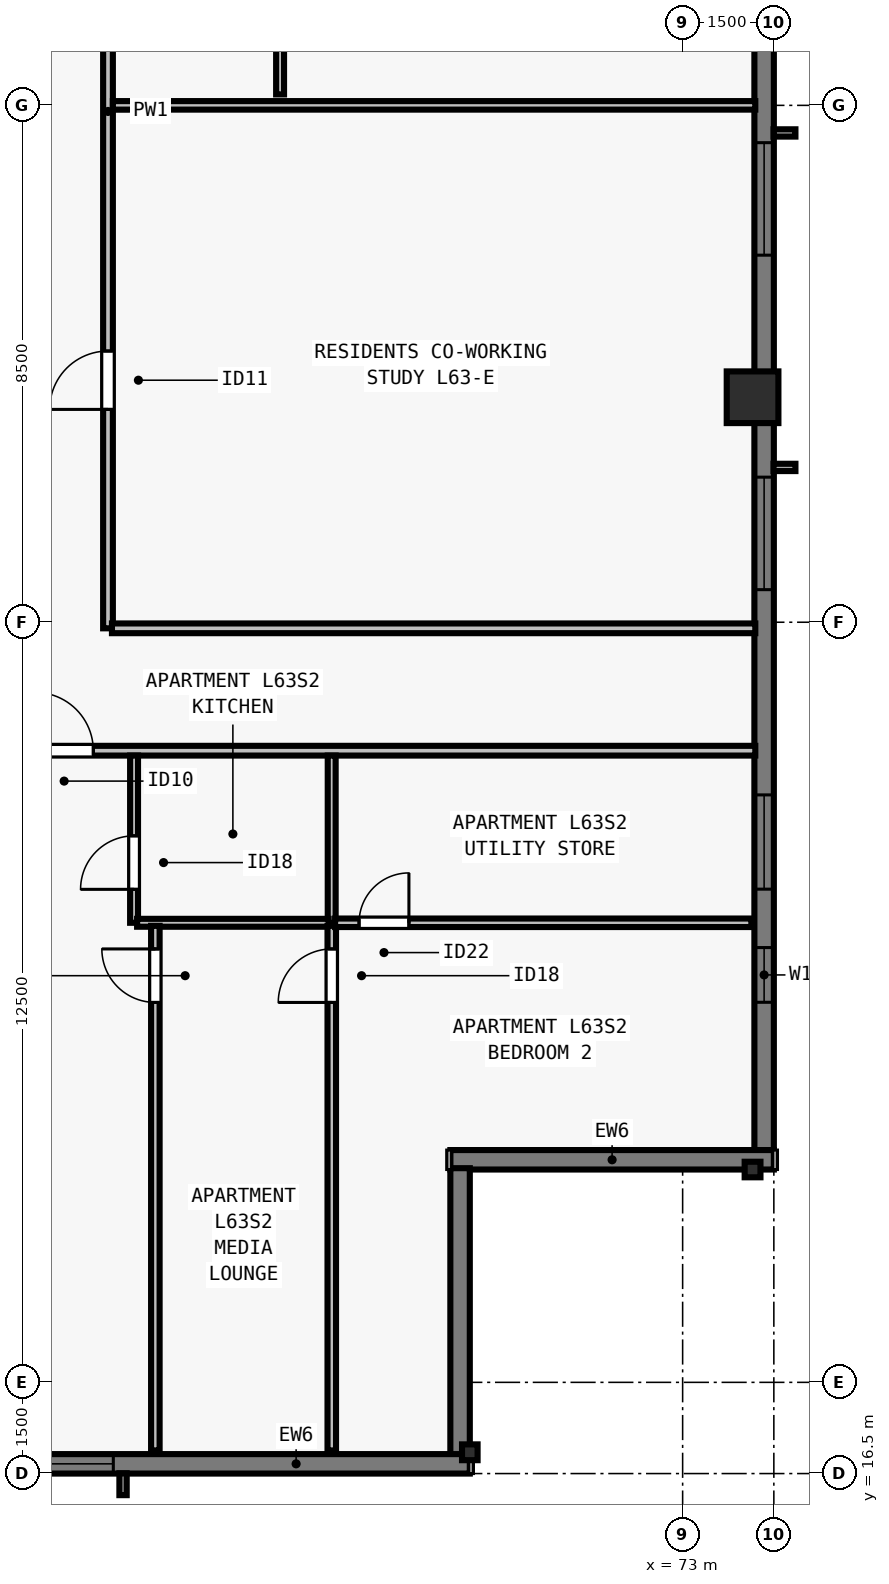
"""IFC4 building model, lengths in metres.
Left out: names, types, materials, properties, quantities, classifications, styles, units other than length and angle.
Written with IfcOpenShell. Run it as: python <this file> out.ifc"""

import sys

from ifc_helpers import new_model, si_unit, direction, frame, frame_2d, origin, origin_2d, place, context, subcontext, project, spatial, rectangle, i_section, extrude, element, fill, save


model = new_model("IFC4")
c1 = context("Model", 3, precision=1e-05, world=origin(), true_north=direction((0.0, 1.0)))
c2 = subcontext(c1, "Body", "Model", "MODEL_VIEW")
j1 = project(units=[si_unit("LENGTHUNIT", "METRE"), si_unit("PLANEANGLEUNIT", "RADIAN")], contexts=[c1])
p1 = place(None, origin())
s1 = spatial("IfcSite", under=j1, at=p1, CompositionType="ELEMENT")
p2 = place(p1, origin())
s2 = spatial("IfcBuilding", under=s1, at=p2, CompositionType="ELEMENT")
p3 = place(p2, frame((0.0, 0.0, 230.5)))
s3 = spatial("IfcBuildingStorey", under=s2, at=p3, CompositionType="ELEMENT", Elevation=230.5)
for number, where, z_axis, x_axis in (
    (1, (69.5, 16.85, 0.0), (0.0, 0.0, 1.0), (1.0, 0.0, 0.0)),
    (2, (74.15, 21.5, 0.0), (0.0, 0.0, 1.0), (0.0, 1.0, 0.0)),
):
    element("IfcColumn", number, at=place(p3, frame(where, z_axis=z_axis, x_axis=x_axis)), inside=s3, PredefinedType="COLUMN", context=c2, shape_type="SweptSolid", body=[
        extrude(i_section(OverallWidth=0.256, OverallDepth=0.26, WebThickness=0.01, FlangeThickness=0.017, FilletRadius=0.013, at=origin_2d()), origin(), (0.0, 0.0, 1.0), 3.5),
    ])
p4 = place(p3, frame((74.15, 34.2, 0.0), z_axis=(0.0, 0.0, 1.0), x_axis=(0.0, 1.0, 0.0)))
e3 = element("IfcColumn", 3, at=p4, inside=s3, PredefinedType="COLUMN", context=c2, shape_type="SweptSolid", body=[
    extrude(rectangle(XDim=0.85, YDim=0.85, at=origin_2d()), origin(), (0.0, 0.0, 1.0), 3.5),
])
p5 = place(p3, frame((74.34, 56.5, 0.0), z_axis=(0.0, 0.0, 1.0), x_axis=(0.0, -1.0, 0.0)))
e4 = element("IfcWall", 4, at=p5, inside=s3, PredefinedType="SOLIDWALL", context=c2, shape_type="SweptSolid", body=[
    extrude(rectangle(XDim=34.702, YDim=0.32, at=frame_2d((17.351, 0.0))), origin(), (0.0, 0.0, 1.0), 3.29),
])
p6 = place(p5, frame((4.613, 0.0, 0.8)))
e5 = element("IfcOpeningElement", 5, at=p6, cuts=e4, PredefinedType="OPENING", context=c2, shape_type="SweptSolid", body=[
    extrude(rectangle(XDim=1.85, YDim=1.678, at=frame_2d((0.925, 0.839))), frame((0.0, 0.17, 0.0), z_axis=(0.0, -1.0, 0.0), x_axis=(1.0, 0.0, 0.0)), (0.0, 0.0, 1.0), 0.34),
])
p7 = place(p5, frame((9.388, 0.0, 0.8)))
e6 = element("IfcOpeningElement", 6, at=p7, cuts=e4, PredefinedType="OPENING", context=c2, shape_type="SweptSolid", body=[
    extrude(rectangle(XDim=1.55, YDim=1.678, at=frame_2d((0.775, 0.839))), frame((0.0, 0.17, 0.0), z_axis=(0.0, -1.0, 0.0), x_axis=(1.0, 0.0, 0.0)), (0.0, 0.0, 1.0), 0.34),
])
p8 = place(p5, frame((14.888, 0.0, 0.8)))
e7 = element("IfcOpeningElement", 7, at=p8, cuts=e4, PredefinedType="OPENING", context=c2, shape_type="SweptSolid", body=[
    extrude(rectangle(XDim=1.55, YDim=1.678, at=frame_2d((0.775, 0.839))), frame((0.0, 0.17, 0.0), z_axis=(0.0, -1.0, 0.0), x_axis=(1.0, 0.0, 0.0)), (0.0, 0.0, 1.0), 0.34),
])
p9 = place(p5, frame((18.114, 0.0, 0.8)))
e8 = element("IfcOpeningElement", 8, at=p9, cuts=e4, PredefinedType="OPENING", context=c2, shape_type="SweptSolid", body=[
    extrude(rectangle(XDim=1.85, YDim=1.678, at=frame_2d((0.925, 0.839))), frame((0.0, 0.17, 0.0), z_axis=(0.0, -1.0, 0.0), x_axis=(1.0, 0.0, 0.0)), (0.0, 0.0, 1.0), 0.34),
])
p10 = place(p5, frame((23.614, 0.0, 0.8)))
e9 = element("IfcOpeningElement", 9, at=p10, cuts=e4, PredefinedType="OPENING", context=c2, shape_type="SweptSolid", body=[
    extrude(rectangle(XDim=1.85, YDim=1.678, at=frame_2d((0.925, 0.839))), frame((0.0, 0.17, 0.0), z_axis=(0.0, -1.0, 0.0), x_axis=(1.0, 0.0, 0.0)), (0.0, 0.0, 1.0), 0.34),
])
p11 = place(p5, frame((28.839, 0.0, 0.8)))
e10 = element("IfcOpeningElement", 10, at=p11, cuts=e4, PredefinedType="OPENING", context=c2, shape_type="SweptSolid", body=[
    extrude(rectangle(XDim=1.55, YDim=1.678, at=frame_2d((0.775, 0.839))), frame((0.0, 0.17, 0.0), z_axis=(0.0, -1.0, 0.0), x_axis=(1.0, 0.0, 0.0)), (0.0, 0.0, 1.0), 0.34),
])
p12 = place(p5, frame((31.35, 0.0, 0.8)))
e11 = element("IfcOpeningElement", 11, at=p12, cuts=e4, PredefinedType="OPENING", context=c2, shape_type="SweptSolid", body=[
    extrude(rectangle(XDim=0.9, YDim=1.678, at=frame_2d((0.45, 0.839))), frame((0.0, 0.17, 0.0), z_axis=(0.0, -1.0, 0.0), x_axis=(1.0, 0.0, 0.0)), (0.0, 0.0, 1.0), 0.34),
])
p13 = place(p3, frame((74.5, 21.66, 0.0), z_axis=(0.0, 0.0, 1.0), x_axis=(-1.0, 0.0, 0.0)))
e12 = element("IfcWall", 12, at=p13, inside=s3, PredefinedType="SOLIDWALL", context=c2, shape_type="SweptSolid", body=[
    extrude(rectangle(XDim=5.32, YDim=0.32, at=frame_2d((2.66, 0.0))), origin(), (0.0, 0.0, 1.0), 3.29),
])
p14 = place(p3, frame((69.34, 21.522, 0.0), z_axis=(0.0, 0.0, 1.0), x_axis=(0.0, -1.0, 0.0)))
e13 = element("IfcWall", 13, at=p14, inside=s3, PredefinedType="SOLIDWALL", context=c2, shape_type="SweptSolid", body=[
    extrude(rectangle(XDim=4.724, YDim=0.32, at=frame_2d((2.362, 0.0))), origin(), (0.0, 0.0, 1.0), 3.29),
])
p15 = place(p3, frame((69.5, 16.66, 0.0), z_axis=(0.0, 0.0, 1.0), x_axis=(-1.0, 0.0, 0.0)))
e14 = element("IfcWall", 14, at=p15, inside=s3, PredefinedType="SOLIDWALL", context=c2, shape_type="SweptSolid", body=[
    extrude(rectangle(XDim=34.702, YDim=0.32, at=frame_2d((17.351, 0.0))), origin(), (0.0, 0.0, 1.0), 3.29),
])
p16 = place(p15, frame((5.863, 0.0, 0.8)))
e15 = element("IfcOpeningElement", 15, at=p16, cuts=e14, PredefinedType="OPENING", context=c2, shape_type="SweptSolid", body=[
    extrude(rectangle(XDim=1.85, YDim=1.678, at=frame_2d((0.925, 0.839))), frame((0.0, 0.17, 0.0), z_axis=(0.0, -1.0, 0.0), x_axis=(1.0, 0.0, 0.0)), (0.0, 0.0, 1.0), 0.34),
])
p17 = place(p15, frame((8.138, 0.0, 0.8)))
e16 = element("IfcOpeningElement", 16, at=p17, cuts=e14, PredefinedType="OPENING", context=c2, shape_type="SweptSolid", body=[
    extrude(rectangle(XDim=1.55, YDim=1.678, at=frame_2d((0.775, 0.839))), frame((0.0, 0.17, 0.0), z_axis=(0.0, -1.0, 0.0), x_axis=(1.0, 0.0, 0.0)), (0.0, 0.0, 1.0), 0.34),
])
p18 = place(p15, frame((10.113, 0.0, 0.8)))
e17 = element("IfcOpeningElement", 17, at=p18, cuts=e14, PredefinedType="OPENING", context=c2, shape_type="SweptSolid", body=[
    extrude(rectangle(XDim=1.85, YDim=1.678, at=frame_2d((0.925, 0.839))), frame((0.0, 0.17, 0.0), z_axis=(0.0, -1.0, 0.0), x_axis=(1.0, 0.0, 0.0)), (0.0, 0.0, 1.0), 0.34),
])
p19 = place(p15, frame((14.888, 0.0, 0.8)))
e18 = element("IfcOpeningElement", 18, at=p19, cuts=e14, PredefinedType="OPENING", context=c2, shape_type="SweptSolid", body=[
    extrude(rectangle(XDim=1.55, YDim=1.678, at=frame_2d((0.775, 0.839))), frame((0.0, 0.17, 0.0), z_axis=(0.0, -1.0, 0.0), x_axis=(1.0, 0.0, 0.0)), (0.0, 0.0, 1.0), 0.34),
])
p20 = place(p15, frame((18.564, 0.0, 0.8)))
e19 = element("IfcOpeningElement", 19, at=p20, cuts=e14, PredefinedType="OPENING", context=c2, shape_type="SweptSolid", body=[
    extrude(rectangle(XDim=1.85, YDim=1.678, at=frame_2d((0.925, 0.839))), frame((0.0, 0.17, 0.0), z_axis=(0.0, -1.0, 0.0), x_axis=(1.0, 0.0, 0.0)), (0.0, 0.0, 1.0), 0.34),
])
p21 = place(p15, frame((24.414, 0.0, 0.8)))
e20 = element("IfcOpeningElement", 20, at=p21, cuts=e14, PredefinedType="OPENING", context=c2, shape_type="SweptSolid", body=[
    extrude(rectangle(XDim=1.85, YDim=1.678, at=frame_2d((0.925, 0.839))), frame((0.0, 0.17, 0.0), z_axis=(0.0, -1.0, 0.0), x_axis=(1.0, 0.0, 0.0)), (0.0, 0.0, 1.0), 0.34),
])
p22 = place(p15, frame((28.389, 0.0, 0.8)))
e21 = element("IfcOpeningElement", 21, at=p22, cuts=e14, PredefinedType="OPENING", context=c2, shape_type="SweptSolid", body=[
    extrude(rectangle(XDim=1.55, YDim=1.678, at=frame_2d((0.775, 0.839))), frame((0.0, 0.17, 0.0), z_axis=(0.0, -1.0, 0.0), x_axis=(1.0, 0.0, 0.0)), (0.0, 0.0, 1.0), 0.34),
])
p23 = place(p3, frame((29.805, 28.387, 0.0), z_axis=(0.0, 0.0, 1.0), x_axis=(1.0, 0.0, 0.0)))
e22 = element("IfcWall", 22, at=p23, inside=s3, PredefinedType="PARTITIONING", context=c2, shape_type="SweptSolid", body=[
    extrude(rectangle(XDim=44.39, YDim=0.16, at=frame_2d((22.195, 0.0))), origin(), (0.0, 0.0, 1.0), 2.958),
])
p24 = place(p23, frame((10.464, 0.0, 0.0)))
e23 = element("IfcOpeningElement", 23, at=p24, cuts=e22, PredefinedType="OPENING", context=c2, shape_type="SweptSolid", body=[
    extrude(rectangle(XDim=0.96, YDim=2.18, at=frame_2d((0.48, 1.09))), frame((0.0, 0.09, 0.0), z_axis=(0.0, -1.0, 0.0), x_axis=(1.0, 0.0, 0.0)), (0.0, 0.0, 1.0), 0.18),
])
p25 = place(p23, frame((32.544, 0.0, 0.0)))
e24 = element("IfcOpeningElement", 24, at=p25, cuts=e22, PredefinedType="OPENING", context=c2, shape_type="SweptSolid", body=[
    extrude(rectangle(XDim=0.96, YDim=2.18, at=frame_2d((0.48, 1.09))), frame((0.0, 0.09, 0.0), z_axis=(0.0, -1.0, 0.0), x_axis=(1.0, 0.0, 0.0)), (0.0, 0.0, 1.0), 0.18),
])
p26 = place(p3, frame((63.55, 30.4, 0.0), z_axis=(0.0, 0.0, 1.0), x_axis=(0.0, 1.0, 0.0)))
e25 = element("IfcWall", 25, at=p26, inside=s3, PredefinedType="PARTITIONING", context=c2, shape_type="SweptSolid", body=[
    extrude(rectangle(XDim=17.2, YDim=0.16, at=frame_2d((8.6, 0.0))), origin(), (0.0, 0.0, 1.0), 3.29),
])
p27 = place(p26, frame((3.6, 0.0, 0.0)))
e26 = element("IfcOpeningElement", 26, at=p27, cuts=e25, PredefinedType="OPENING", context=c2, shape_type="SweptSolid", body=[
    extrude(rectangle(XDim=0.96, YDim=2.12, at=frame_2d((0.48, 1.06))), frame((0.0, 0.09, 0.0), z_axis=(0.0, -1.0, 0.0), x_axis=(1.0, 0.0, 0.0)), (0.0, 0.0, 1.0), 0.18),
])
p28 = place(p26, frame((12.44, 0.0, 0.0)))
e27 = element("IfcOpeningElement", 27, at=p28, cuts=e25, PredefinedType="OPENING", context=c2, shape_type="SweptSolid", body=[
    extrude(rectangle(XDim=0.96, YDim=2.18, at=frame_2d((0.48, 1.09))), frame((0.0, 0.09, 0.0), z_axis=(0.0, -1.0, 0.0), x_axis=(1.0, 0.0, 0.0)), (0.0, 0.0, 1.0), 0.18),
])
p29 = place(p3, frame((63.615, 30.4, 0.0), z_axis=(0.0, 0.0, 1.0), x_axis=(1.0, 0.0, 0.0)))
e28 = element("IfcWall", 28, at=p29, inside=s3, PredefinedType="PARTITIONING", context=c2, shape_type="SweptSolid", body=[
    extrude(rectangle(XDim=10.58, YDim=0.16, at=frame_2d((5.29, 0.0))), origin(), (0.0, 0.0, 1.0), 3.29),
])
p30 = place(p3, frame((67.229, 25.558, 0.0), z_axis=(0.0, 0.0, 1.0), x_axis=(0.0, 1.0, 0.0)))
e29 = element("IfcWall", 29, at=p30, inside=s3, PredefinedType="PLUMBINGWALL", context=c2, shape_type="SweptSolid", body=[
    extrude(rectangle(XDim=2.75, YDim=0.13, at=frame_2d((1.375, 0.0))), origin(), (0.0, 0.0, 1.0), 3.29),
])
p31 = place(p3, frame((63.979, 25.558, 0.0), z_axis=(0.0, 0.0, 1.0), x_axis=(0.0, 1.0, 0.0)))
e30 = element("IfcWall", 30, at=p31, inside=s3, PredefinedType="PLUMBINGWALL", context=c2, shape_type="SweptSolid", body=[
    extrude(rectangle(XDim=2.75, YDim=0.13, at=frame_2d((1.375, 0.0))), origin(), (0.0, 0.0, 1.0), 3.29),
])
p32 = place(p31, frame((0.55, 0.0, 0.0)))
e31 = element("IfcOpeningElement", 31, at=p32, cuts=e30, PredefinedType="OPENING", context=c2, shape_type="SweptSolid", body=[
    extrude(rectangle(XDim=0.88, YDim=2.1, at=frame_2d((0.44, 1.05))), frame((0.0, 0.075, 0.0), z_axis=(0.0, -1.0, 0.0), x_axis=(1.0, 0.0, 0.0)), (0.0, 0.0, 1.0), 0.15),
])
p33 = place(p3, frame((64.029, 25.558, 0.0), z_axis=(0.0, 0.0, 1.0), x_axis=(1.0, 0.0, 0.0)))
e32 = element("IfcWall", 32, at=p33, inside=s3, PredefinedType="PLUMBINGWALL", context=c2, shape_type="SweptSolid", body=[
    extrude(rectangle(XDim=3.15, YDim=0.13, at=frame_2d((1.575, 0.0))), origin(), (0.0, 0.0, 1.0), 3.29),
])
p34 = place(p3, frame((67.23, 16.88, 0.0), z_axis=(0.0, 0.0, 1.0), x_axis=(0.0, 1.0, 0.0)))
e33 = element("IfcWall", 33, at=p34, inside=s3, PredefinedType="PARTITIONING", context=c2, shape_type="SweptSolid", body=[
    extrude(rectangle(XDim=8.628, YDim=0.14, at=frame_2d((4.314, 0.0))), origin(), (0.0, 0.0, 1.0), 2.573),
])
p35 = place(p34, frame((7.367, 0.0, 0.0)))
e34 = element("IfcOpeningElement", 34, at=p35, cuts=e33, PredefinedType="OPENING", context=c2, shape_type="SweptSolid", body=[
    extrude(rectangle(XDim=0.88, YDim=2.1, at=frame_2d((0.44, 1.05))), frame((0.0, 0.08, 0.0), z_axis=(0.0, -1.0, 0.0), x_axis=(1.0, 0.0, 0.0)), (0.0, 0.0, 1.0), 0.16),
])
p36 = place(p3, frame((67.285, 25.558, 0.0), z_axis=(0.0, 0.0, 1.0), x_axis=(1.0, 0.0, 0.0)))
e35 = element("IfcWall", 35, at=p36, inside=s3, PredefinedType="PARTITIONING", context=c2, shape_type="SweptSolid", body=[
    extrude(rectangle(XDim=6.845, YDim=0.14, at=frame_2d((3.422, 0.0))), origin(), (0.0, 0.0, 1.0), 2.958),
])
p37 = place(p36, frame((0.394, 0.0, 0.0)))
e36 = element("IfcOpeningElement", 36, at=p37, cuts=e35, PredefinedType="OPENING", context=c2, shape_type="SweptSolid", body=[
    extrude(rectangle(XDim=0.82, YDim=2.1, at=frame_2d((0.41, 1.05))), frame((0.0, 0.08, 0.0), z_axis=(0.0, -1.0, 0.0), x_axis=(1.0, 0.0, 0.0)), (0.0, 0.0, 1.0), 0.16),
])
p38 = place(p3, frame((64.329, 16.88, 0.0), z_axis=(0.0, 0.0, 1.0), x_axis=(0.0, 1.0, 0.0)))
e37 = element("IfcWall", 37, at=p38, inside=s3, PredefinedType="PARTITIONING", context=c2, shape_type="SweptSolid", body=[
    extrude(rectangle(XDim=8.628, YDim=0.14, at=frame_2d((4.314, 0.0))), origin(), (0.0, 0.0, 1.0), 2.573),
])
p39 = place(p38, frame((7.367, 0.0, 0.0)))
e38 = element("IfcOpeningElement", 38, at=p39, cuts=e37, PredefinedType="OPENING", context=c2, shape_type="SweptSolid", body=[
    extrude(rectangle(XDim=0.88, YDim=2.1, at=frame_2d((0.44, 1.05))), frame((0.0, 0.08, 0.0), z_axis=(0.0, -1.0, 0.0), x_axis=(1.0, 0.0, 0.0)), (0.0, 0.0, 1.0), 0.16),
])
p40 = place(p3, frame((63.63, 39.0, 0.0), z_axis=(0.0, 0.0, 1.0), x_axis=(1.0, 0.0, 0.0)))
e39 = element("IfcWall", 39, at=p40, inside=s3, PredefinedType="PARTITIONING", context=c2, shape_type="SweptSolid", body=[
    extrude(rectangle(XDim=10.565, YDim=0.14, at=frame_2d((5.283, 0.0))), origin(), (0.0, 0.0, 1.0), 3.29),
])
p41 = place(p3, frame((66.38, 39.18, 0.0), z_axis=(0.0, 0.0, 1.0), x_axis=(0.0, 1.0, 0.0)))
e40 = element("IfcWall", 40, at=p41, inside=s3, PredefinedType="PLUMBINGWALL", context=c2, shape_type="SweptSolid", body=[
    extrude(rectangle(XDim=2.94, YDim=0.13, at=frame_2d((1.47, 0.0))), origin(), (0.0, 0.0, 1.0), 3.29),
])
p42 = place(p9, origin())
e41 = element("IfcWindow", 41, at=p42, inside=s3, PartitioningType="SINGLE_PANEL", PredefinedType="WINDOW", context=c2, shape_type="SweptSolid", body=[
    extrude(rectangle(XDim=1.85, YDim=1.678, at=frame_2d((0.925, 0.839))), frame((0.0, -0.05, 0.0), z_axis=(0.0, -1.0, 0.0), x_axis=(1.0, 0.0, 0.0)), (0.0, 0.0, 1.0), 0.06),
])
fill(e8, e41)
p43 = place(p10, origin())
e42 = element("IfcWindow", 42, at=p43, inside=s3, PartitioningType="SINGLE_PANEL", PredefinedType="WINDOW", context=c2, shape_type="SweptSolid", body=[
    extrude(rectangle(XDim=1.85, YDim=1.678, at=frame_2d((0.925, 0.839))), frame((0.0, -0.05, 0.0), z_axis=(0.0, -1.0, 0.0), x_axis=(1.0, 0.0, 0.0)), (0.0, 0.0, 1.0), 0.06),
])
fill(e9, e42)
p44 = place(p11, origin())
e43 = element("IfcWindow", 43, at=p44, inside=s3, PartitioningType="SINGLE_PANEL", PredefinedType="WINDOW", context=c2, shape_type="SweptSolid", body=[
    extrude(rectangle(XDim=1.55, YDim=1.678, at=frame_2d((0.775, 0.839))), frame((0.0, -0.05, 0.0), z_axis=(0.0, -1.0, 0.0), x_axis=(1.0, 0.0, 0.0)), (0.0, 0.0, 1.0), 0.06),
])
fill(e10, e43)
p45 = place(p16, origin())
e44 = element("IfcWindow", 44, at=p45, inside=s3, PartitioningType="SINGLE_PANEL", PredefinedType="WINDOW", context=c2, shape_type="SweptSolid", body=[
    extrude(rectangle(XDim=1.85, YDim=1.678, at=frame_2d((0.925, 0.839))), frame((0.0, -0.05, 0.0), z_axis=(0.0, -1.0, 0.0), x_axis=(1.0, 0.0, 0.0)), (0.0, 0.0, 1.0), 0.06),
])
fill(e15, e44)
p46 = place(p12, origin())
e45 = element("IfcWindow", 45, at=p46, inside=s3, PartitioningType="SINGLE_PANEL", PredefinedType="WINDOW", context=c2, shape_type="SweptSolid", body=[
    extrude(rectangle(XDim=0.9, YDim=1.678, at=frame_2d((0.45, 0.839))), frame((0.0, -0.04, 0.0), z_axis=(0.0, -1.0, 0.0), x_axis=(1.0, 0.0, 0.0)), (0.0, 0.0, 1.0), 0.06),
])
fill(e11, e45)
p47 = place(p32, origin())
e46 = element("IfcDoor", 46, at=p47, inside=s3, OperationType="SINGLE_SWING_LEFT", PredefinedType="DOOR", context=c2, shape_type="SweptSolid", body=[
    extrude(rectangle(XDim=0.88, YDim=2.1, at=frame_2d((0.44, 1.05))), frame((0.0, 0.025, 0.0), z_axis=(0.0, -1.0, 0.0), x_axis=(1.0, 0.0, 0.0)), (0.0, 0.0, 1.0), 0.05),
])
fill(e31, e46)
p48 = place(p37, origin())
e47 = element("IfcDoor", 47, at=p48, inside=s3, OperationType="SINGLE_SWING_RIGHT", PredefinedType="DOOR", context=c2, shape_type="SweptSolid", body=[
    extrude(rectangle(XDim=0.82, YDim=2.1, at=frame_2d((0.41, 1.05))), frame((0.0, 0.025, 0.0), z_axis=(0.0, -1.0, 0.0), x_axis=(1.0, 0.0, 0.0)), (0.0, 0.0, 1.0), 0.05),
])
fill(e36, e47)
p49 = place(p35, origin())
e48 = element("IfcDoor", 48, at=p49, inside=s3, OperationType="SINGLE_SWING_LEFT", PredefinedType="DOOR", context=c2, shape_type="SweptSolid", body=[
    extrude(rectangle(XDim=0.88, YDim=2.1, at=frame_2d((0.44, 1.05))), frame((0.0, 0.025, 0.0), z_axis=(0.0, -1.0, 0.0), x_axis=(1.0, 0.0, 0.0)), (0.0, 0.0, 1.0), 0.05),
])
fill(e34, e48)
p50 = place(p39, origin())
e49 = element("IfcDoor", 49, at=p50, inside=s3, OperationType="SINGLE_SWING_RIGHT", PredefinedType="DOOR", context=c2, shape_type="SweptSolid", body=[
    extrude(rectangle(XDim=0.88, YDim=2.1, at=frame_2d((0.44, 1.05))), frame((0.0, 0.025, 0.0), z_axis=(0.0, -1.0, 0.0), x_axis=(1.0, 0.0, 0.0)), (0.0, 0.0, 1.0), 0.05),
])
fill(e38, e49)
p51 = place(p25, origin())
e50 = element("IfcDoor", 50, at=p51, inside=s3, OperationType="SINGLE_SWING_LEFT", PredefinedType="DOOR", context=c2, shape_type="SweptSolid", body=[
    extrude(rectangle(XDim=0.96, YDim=2.18, at=frame_2d((0.48, 1.09))), frame((0.0, 0.025, 0.0), z_axis=(0.0, -1.0, 0.0), x_axis=(1.0, 0.0, 0.0)), (0.0, 0.0, 1.0), 0.05),
])
fill(e24, e50)
p52 = place(p27, origin())
e51 = element("IfcDoor", 51, at=p52, inside=s3, OperationType="SINGLE_SWING_LEFT", PredefinedType="DOOR", context=c2, shape_type="SweptSolid", body=[
    extrude(rectangle(XDim=0.96, YDim=2.12, at=frame_2d((0.48, 1.06))), frame((0.0, 0.025, 0.0), z_axis=(0.0, -1.0, 0.0), x_axis=(1.0, 0.0, 0.0)), (0.0, 0.0, 1.0), 0.05),
])
fill(e26, e51)
save(model, sys.argv[1])
